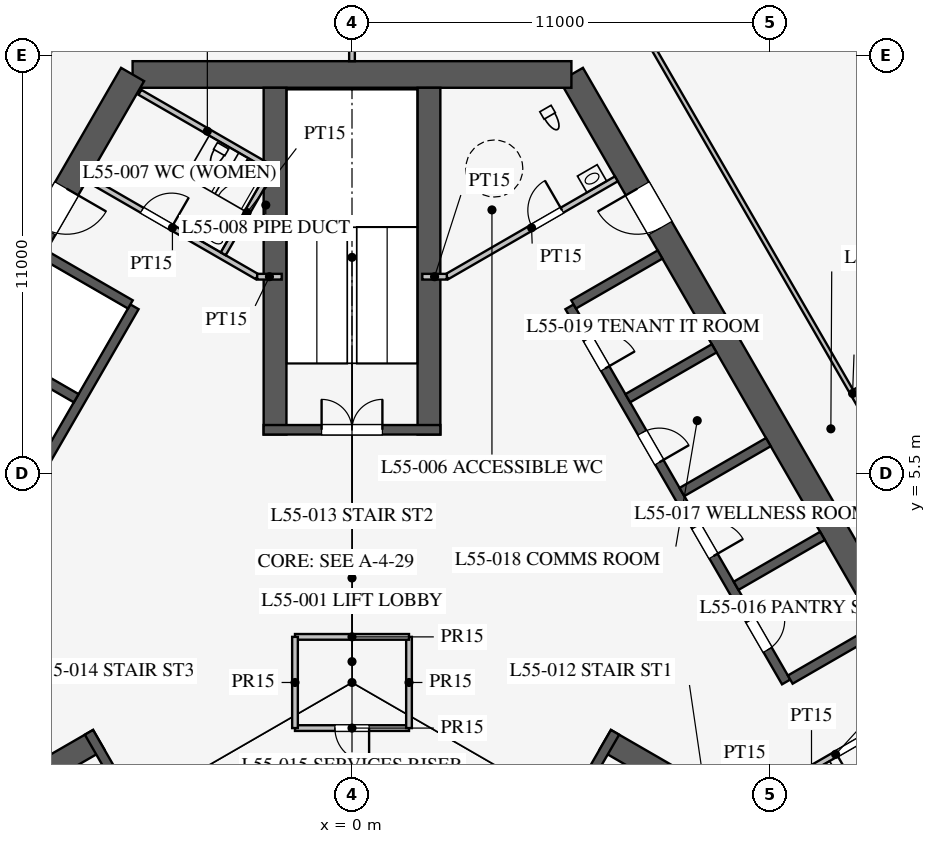
"""IFC4 building model, lengths in metres.
Left out: names, types, materials, properties, quantities, classifications, styles, units other than length and angle.
Written with IfcOpenShell. Run it as: python <this file> out.ifc"""

import sys

from ifc_helpers import new_model, si_unit, direction, frame, frame_2d, origin, place, context, subcontext, project, spatial, rectangle, extrude, element, fill, save


model = new_model("IFC4")
c1 = context("Model", 3, precision=1e-05, world=origin(), true_north=direction((0.0, 1.0)))
c2 = subcontext(c1, "Body", "Model", "MODEL_VIEW")
j1 = project(units=[si_unit("LENGTHUNIT", "METRE"), si_unit("PLANEANGLEUNIT", "RADIAN")], contexts=[c1])
p1 = place(None, origin())
s1 = spatial("IfcSite", under=j1, at=p1, CompositionType="ELEMENT")
p2 = place(p1, origin())
s2 = spatial("IfcBuilding", under=s1, at=p2, CompositionType="ELEMENT")
p3 = place(p2, frame((0.0, 0.0, 240.1)))
s3 = spatial("IfcBuildingStorey", under=s2, at=p3, CompositionType="ELEMENT", Elevation=240.1)
p4 = place(p3, frame((16.743, -3.0, 0.0), z_axis=(0.0, 0.0, 1.0), x_axis=(-0.500002442456, 0.866023993627, 0.0)))
e1 = element("IfcWall", 1, at=p4, inside=s3, PredefinedType="SHEAR", context=c2, shape_type="SweptSolid", body=[
    extrude(rectangle(XDim=21.939, YDim=0.7, at=frame_2d((10.97, 0.0))), origin(), (0.0, 0.0, 1.0), 4.2),
])
p5 = place(p4, frame((17.27, 0.0, 0.0)))
e2 = element("IfcOpeningElement", 2, at=p5, cuts=e1, PredefinedType="OPENING", context=c2, shape_type="SweptSolid", body=[
    extrude(rectangle(XDim=1.2, YDim=2.1, at=frame_2d((0.6, 1.05))), frame((0.0, 0.36, 0.0), z_axis=(0.0, -1.0, 0.0), x_axis=(1.0, 0.0, 0.0)), (0.0, 0.0, 1.0), 0.72),
])
p6 = place(p4, frame((3.47, 0.0, 0.0)))
e3 = element("IfcOpeningElement", 3, at=p6, cuts=e1, PredefinedType="OPENING", context=c2, shape_type="SweptSolid", body=[
    extrude(rectangle(XDim=1.2, YDim=2.1, at=frame_2d((0.6, 1.05))), frame((0.0, 0.36, 0.0), z_axis=(0.0, -1.0, 0.0), x_axis=(1.0, 0.0, 0.0)), (0.0, 0.0, 1.0), 0.72),
])
p7 = place(p3, frame((5.773, 16.0, 0.0), z_axis=(0.0, 0.0, 1.0), x_axis=(-1.0, 0.0, 0.0)))
e4 = element("IfcWall", 4, at=p7, inside=s3, PredefinedType="SHEAR", context=c2, shape_type="SweptSolid", body=[
    extrude(rectangle(XDim=11.547, YDim=0.7, at=frame_2d((5.773, 0.0))), origin(), (0.0, 0.0, 1.0), 4.2),
])
p8 = place(p3, frame((-5.773, 16.0, 0.0), z_axis=(0.0, 0.0, 1.0), x_axis=(-0.500002442456, -0.866023993627, 0.0)))
e5 = element("IfcWall", 5, at=p8, inside=s3, PredefinedType="SHEAR", context=c2, shape_type="SweptSolid", body=[
    extrude(rectangle(XDim=21.939, YDim=0.7, at=frame_2d((10.97, 0.0))), origin(), (0.0, 0.0, 1.0), 4.2),
])
p9 = place(p8, frame((17.27, 0.0, 0.0)))
e6 = element("IfcOpeningElement", 6, at=p9, cuts=e5, PredefinedType="OPENING", context=c2, shape_type="SweptSolid", body=[
    extrude(rectangle(XDim=1.2, YDim=2.1, at=frame_2d((0.6, 1.05))), frame((0.0, 0.36, 0.0), z_axis=(0.0, -1.0, 0.0), x_axis=(1.0, 0.0, 0.0)), (0.0, 0.0, 1.0), 0.72),
])
p10 = place(p8, frame((3.47, 0.0, 0.0)))
e7 = element("IfcOpeningElement", 7, at=p10, cuts=e5, PredefinedType="OPENING", context=c2, shape_type="SweptSolid", body=[
    extrude(rectangle(XDim=1.2, YDim=2.1, at=frame_2d((0.6, 1.05))), frame((0.0, 0.36, 0.0), z_axis=(0.0, -1.0, 0.0), x_axis=(1.0, 0.0, 0.0)), (0.0, 0.0, 1.0), 0.72),
])
p11 = place(p3, frame((11.424, 0.014, 0.0), z_axis=(0.0, 0.0, 1.0), x_axis=(-0.500001763848, 0.866024385424, 0.0)))
e8 = element("IfcWall", 8, at=p11, inside=s3, PredefinedType="SHEAR", context=c2, shape_type="SweptSolid", body=[
    extrude(rectangle(XDim=11.4, YDim=0.25, at=frame_2d((5.7, 0.0))), origin(), (0.0, 0.0, 1.0), 4.2),
])
p12 = place(p11, frame((0.975, 0.0, 0.0)))
e9 = element("IfcOpeningElement", 9, at=p12, cuts=e8, PredefinedType="OPENING", context=c2, shape_type="SweptSolid", body=[
    extrude(rectangle(XDim=0.9, YDim=2.1, at=frame_2d((0.45, 1.05))), frame((0.0, 0.135, 0.0), z_axis=(0.0, -1.0, 0.0), x_axis=(1.0, 0.0, 0.0)), (0.0, 0.0, 1.0), 0.27),
])
p13 = place(p11, frame((3.825, 0.0, 0.0)))
e10 = element("IfcOpeningElement", 10, at=p13, cuts=e8, PredefinedType="OPENING", context=c2, shape_type="SweptSolid", body=[
    extrude(rectangle(XDim=0.9, YDim=2.1, at=frame_2d((0.45, 1.05))), frame((0.0, 0.135, 0.0), z_axis=(0.0, -1.0, 0.0), x_axis=(1.0, 0.0, 0.0)), (0.0, 0.0, 1.0), 0.27),
])
p14 = place(p11, frame((6.675, 0.0, 0.0)))
e11 = element("IfcOpeningElement", 11, at=p14, cuts=e8, PredefinedType="OPENING", context=c2, shape_type="SweptSolid", body=[
    extrude(rectangle(XDim=0.9, YDim=2.1, at=frame_2d((0.45, 1.05))), frame((0.0, 0.135, 0.0), z_axis=(0.0, -1.0, 0.0), x_axis=(1.0, 0.0, 0.0)), (0.0, 0.0, 1.0), 0.27),
])
p15 = place(p11, frame((9.525, 0.0, 0.0)))
e12 = element("IfcOpeningElement", 12, at=p15, cuts=e8, PredefinedType="OPENING", context=c2, shape_type="SweptSolid", body=[
    extrude(rectangle(XDim=0.9, YDim=2.1, at=frame_2d((0.45, 1.05))), frame((0.0, 0.135, 0.0), z_axis=(0.0, -1.0, 0.0), x_axis=(1.0, 0.0, 0.0)), (0.0, 0.0, 1.0), 0.27),
])
for number, where, z_axis, x_axis in (
    (13, (11.532, 0.076, 0.0), (0.0, 0.0, 1.0), (0.866, 0.5, 0.0)),
    (14, (10.107, 2.544, 0.0), (0.0, 0.0, 1.0), (0.866, 0.5, 0.0)),
    (15, (8.682, 5.012, 0.0), (0.0, 0.0, 1.0), (0.866, 0.5, 0.0)),
    (16, (7.257, 7.481, 0.0), (0.0, 0.0, 1.0), (0.866, 0.5, 0.0)),
    (17, (5.832, 9.949, 0.0), (0.0, 0.0, 1.0), (0.866, 0.5, 0.0)),
):
    element("IfcWall", number, at=place(p3, frame(where, z_axis=z_axis, x_axis=x_axis)), inside=s3, PredefinedType="SHEAR", context=c2, shape_type="SweptSolid", body=[
        extrude(rectangle(XDim=2.625, YDim=0.25, at=frame_2d((1.312, 0.0))), origin(), (0.0, 0.0, 1.0), 4.2),
    ])
p16 = place(p3, frame((-5.724, 9.886, 0.0), z_axis=(0.0, 0.0, 1.0), x_axis=(-0.500001763848, -0.866024385424, 0.0)))
e18 = element("IfcWall", 18, at=p16, inside=s3, PredefinedType="SHEAR", context=c2, shape_type="SweptSolid", body=[
    extrude(rectangle(XDim=11.4, YDim=0.25, at=frame_2d((5.7, 0.0))), origin(), (0.0, 0.0, 1.0), 4.2),
])
p17 = place(p16, frame((6.525, 0.0, 0.0)))
e19 = element("IfcOpeningElement", 19, at=p17, cuts=e18, PredefinedType="OPENING", context=c2, shape_type="SweptSolid", body=[
    extrude(rectangle(XDim=1.2, YDim=2.2, at=frame_2d((0.6, 1.1))), frame((0.0, 0.135, 0.0), z_axis=(0.0, -1.0, 0.0), x_axis=(1.0, 0.0, 0.0)), (0.0, 0.0, 1.0), 0.27),
])
p18 = place(p16, frame((9.375, 0.0, 0.0)))
e20 = element("IfcOpeningElement", 20, at=p18, cuts=e18, PredefinedType="OPENING", context=c2, shape_type="SweptSolid", body=[
    extrude(rectangle(XDim=1.2, YDim=2.2, at=frame_2d((0.6, 1.1))), frame((0.0, 0.135, 0.0), z_axis=(0.0, -1.0, 0.0), x_axis=(1.0, 0.0, 0.0)), (0.0, 0.0, 1.0), 0.27),
])
for number, where, z_axis, x_axis in (
    (21, (-5.832, 9.949, 0.0), (0.0, 0.0, 1.0), (-0.866, 0.5, 0.0)),
    (22, (-7.257, 7.481, 0.0), (0.0, 0.0, 1.0), (-0.866, 0.5, 0.0)),
):
    element("IfcWall", number, at=place(p3, frame(where, z_axis=z_axis, x_axis=x_axis)), inside=s3, PredefinedType="SHEAR", context=c2, shape_type="SweptSolid", body=[
        extrude(rectangle(XDim=2.625, YDim=0.25, at=frame_2d((1.312, 0.0))), origin(), (0.0, 0.0, 1.0), 4.2),
    ])
p19 = place(p3, frame((6.663, -1.509, 0.0), z_axis=(0.0, 0.0, 1.0), x_axis=(0.866028310072, -0.499994966129, 0.0)))
e23 = element("IfcWall", 23, at=p19, inside=s3, PredefinedType="SHEAR", context=c2, shape_type="SweptSolid", body=[
    extrude(rectangle(XDim=9.125, YDim=0.6, at=frame_2d((4.562, 0.0))), origin(), (0.0, 0.0, 1.0), 4.2),
])
p20 = place(p3, frame((4.597, -5.339, 0.0), z_axis=(0.0, 0.0, 1.0), x_axis=(0.499984536904, 0.866034331223, 0.0)))
e24 = element("IfcWall", 24, at=p20, inside=s3, PredefinedType="SHEAR", context=c2, shape_type="SweptSolid", body=[
    extrude(rectangle(XDim=4.65, YDim=0.25, at=frame_2d((2.325, 0.0))), origin(), (0.0, 0.0, 1.0), 4.2),
])
p21 = place(p20, frame((1.525, 0.0, 0.0)))
e25 = element("IfcOpeningElement", 25, at=p21, cuts=e24, PredefinedType="OPENING", context=c2, shape_type="SweptSolid", body=[
    extrude(rectangle(XDim=1.6, YDim=2.1, at=frame_2d((0.8, 1.05))), frame((0.0, 0.135, 0.0), z_axis=(0.0, -1.0, 0.0), x_axis=(1.0, 0.0, 0.0)), (0.0, 0.0, 1.0), 0.27),
])
for number, where, z_axis, x_axis in (
    (26, (2.025, 6.525, 0.0), (0.0, 0.0, 1.0), (0.0, 1.0, 0.0)),
    (27, (-2.025, 6.525, 0.0), (0.0, 0.0, 1.0), (0.0, 1.0, 0.0)),
):
    element("IfcWall", number, at=place(p3, frame(where, z_axis=z_axis, x_axis=x_axis)), inside=s3, PredefinedType="SHEAR", context=c2, shape_type="SweptSolid", body=[
        extrude(rectangle(XDim=9.125, YDim=0.6, at=frame_2d((4.562, 0.0))), origin(), (0.0, 0.0, 1.0), 4.2),
    ])
p22 = place(p3, frame((2.325, 6.65, 0.0), z_axis=(0.0, 0.0, 1.0), x_axis=(-1.0, 0.0, 0.0)))
e28 = element("IfcWall", 28, at=p22, inside=s3, PredefinedType="SHEAR", context=c2, shape_type="SweptSolid", body=[
    extrude(rectangle(XDim=4.65, YDim=0.25, at=frame_2d((2.325, 0.0))), origin(), (0.0, 0.0, 1.0), 4.2),
])
p23 = place(p22, frame((1.525, 0.0, 0.0)))
e29 = element("IfcOpeningElement", 29, at=p23, cuts=e28, PredefinedType="OPENING", context=c2, shape_type="SweptSolid", body=[
    extrude(rectangle(XDim=1.6, YDim=2.1, at=frame_2d((0.8, 1.05))), frame((0.0, 0.135, 0.0), z_axis=(0.0, -1.0, 0.0), x_axis=(1.0, 0.0, 0.0)), (0.0, 0.0, 1.0), 0.27),
])
p24 = place(p3, frame((-6.663, -1.509, 0.0), z_axis=(0.0, 0.0, 1.0), x_axis=(-0.866028310072, -0.499994966129, 0.0)))
e30 = element("IfcWall", 30, at=p24, inside=s3, PredefinedType="SHEAR", context=c2, shape_type="SweptSolid", body=[
    extrude(rectangle(XDim=9.125, YDim=0.6, at=frame_2d((4.562, 0.0))), origin(), (0.0, 0.0, 1.0), 4.2),
])
p25 = place(p3, frame((-6.922, -1.312, 0.0), z_axis=(0.0, 0.0, 1.0), x_axis=(0.499984536904, -0.866034331223, 0.0)))
e31 = element("IfcWall", 31, at=p25, inside=s3, PredefinedType="SHEAR", context=c2, shape_type="SweptSolid", body=[
    extrude(rectangle(XDim=4.65, YDim=0.25, at=frame_2d((2.325, 0.0))), origin(), (0.0, 0.0, 1.0), 4.2),
])
p26 = place(p25, frame((1.525, 0.0, 0.0)))
e32 = element("IfcOpeningElement", 32, at=p26, cuts=e31, PredefinedType="OPENING", context=c2, shape_type="SweptSolid", body=[
    extrude(rectangle(XDim=1.6, YDim=2.1, at=frame_2d((0.8, 1.05))), frame((0.0, 0.135, 0.0), z_axis=(0.0, -1.0, 0.0), x_axis=(1.0, 0.0, 0.0)), (0.0, 0.0, 1.0), 0.27),
])
p27 = place(p3, frame((2.495, 10.678, 0.0), z_axis=(0.0, 0.0, 1.0), x_axis=(0.866037967349, 0.499978238636, 0.0)))
e33 = element("IfcWall", 33, at=p27, inside=s3, PredefinedType="PARTITIONING", context=c2, shape_type="SweptSolid", body=[
    extrude(rectangle(XDim=5.15, YDim=0.15, at=frame_2d((2.575, 0.0))), origin(), (0.0, 0.0, 1.0), 4.0),
])
p28 = place(p27, frame((2.6, 0.0, 0.0)))
e34 = element("IfcOpeningElement", 34, at=p28, cuts=e33, PredefinedType="OPENING", context=c2, shape_type="SweptSolid", body=[
    extrude(rectangle(XDim=0.9, YDim=2.1, at=frame_2d((0.45, 1.05))), frame((0.0, 0.085, 0.0), z_axis=(0.0, -1.0, 0.0), x_axis=(1.0, 0.0, 0.0)), (0.0, 0.0, 1.0), 0.17),
])
p29 = place(p3, frame((10.495, -3.178, 0.0), z_axis=(0.0, 0.0, 1.0), x_axis=(0.866037967349, 0.499978238636, 0.0)))
e35 = element("IfcWall", 35, at=p29, inside=s3, PredefinedType="PARTITIONING", context=c2, shape_type="SweptSolid", body=[
    extrude(rectangle(XDim=5.15, YDim=0.15, at=frame_2d((2.575, 0.0))), origin(), (0.0, 0.0, 1.0), 4.0),
])
p30 = place(p29, frame((2.6, 0.0, 0.0)))
e36 = element("IfcOpeningElement", 36, at=p30, cuts=e35, PredefinedType="OPENING", context=c2, shape_type="SweptSolid", body=[
    extrude(rectangle(XDim=0.9, YDim=2.1, at=frame_2d((0.45, 1.05))), frame((0.0, 0.085, 0.0), z_axis=(0.0, -1.0, 0.0), x_axis=(1.0, 0.0, 0.0)), (0.0, 0.0, 1.0), 0.17),
])
p31 = place(p3, frame((-2.495, 10.678, 0.0), z_axis=(0.0, 0.0, 1.0), x_axis=(-0.866037967349, 0.499978238636, 0.0)))
e37 = element("IfcWall", 37, at=p31, inside=s3, PredefinedType="PARTITIONING", context=c2, shape_type="SweptSolid", body=[
    extrude(rectangle(XDim=5.15, YDim=0.15, at=frame_2d((2.575, 0.0))), origin(), (0.0, 0.0, 1.0), 4.0),
])
p32 = place(p31, frame((2.6, 0.0, 0.0)))
e38 = element("IfcOpeningElement", 38, at=p32, cuts=e37, PredefinedType="OPENING", context=c2, shape_type="SweptSolid", body=[
    extrude(rectangle(XDim=0.9, YDim=2.1, at=frame_2d((0.45, 1.05))), frame((0.0, 0.085, 0.0), z_axis=(0.0, -1.0, 0.0), x_axis=(1.0, 0.0, 0.0)), (0.0, 0.0, 1.0), 0.17),
])
for number, where, z_axis, x_axis in (
    (39, (2.495, 10.678, 0.0), (0.0, 0.0, 1.0), (-1.0, 0.0, 0.0)),
    (40, (-2.495, 10.678, 0.0), (0.0, 0.0, 1.0), (1.0, 0.0, 0.0)),
):
    element("IfcWall", number, at=place(p3, frame(where, z_axis=z_axis, x_axis=x_axis)), inside=s3, PredefinedType="PARTITIONING", context=c2, shape_type="SweptSolid", body=[
        extrude(rectangle(XDim=0.645, YDim=0.15, at=frame_2d((0.323, 0.0))), origin(), (0.0, 0.0, 1.0), 4.0),
    ])
p33 = place(p3, frame((-2.031, 13.482, 0.0), z_axis=(0.0, 0.0, 1.0), x_axis=(-0.866050731258, 0.499956128963, 0.0)))
e41 = element("IfcWall", 41, at=p33, inside=s3, PredefinedType="PARTITIONING", context=c2, shape_type="SweptSolid", body=[
    extrude(rectangle(XDim=4.1, YDim=0.15, at=frame_2d((2.05, 0.0))), origin(), (0.0, 0.0, 1.0), 4.0),
])
p34 = place(p3, frame((-3.389, 11.281, 0.0), z_axis=(0.0, 0.0, 1.0), x_axis=(0.499989096993, 0.866031698547, 0.0)))
e42 = element("IfcWall", 42, at=p34, inside=s3, PredefinedType="PARTITIONING", context=c2, shape_type="SweptSolid", body=[
    extrude(rectangle(XDim=2.51, YDim=0.15, at=frame_2d((1.255, 0.0))), origin(), (0.0, 0.0, 1.0), 4.0),
])
p35 = place(p3, frame((-1.5, -1.2, 0.0), z_axis=(0.0, 0.0, 1.0), x_axis=(1.0, 0.0, 0.0)))
e43 = element("IfcWall", 43, at=p35, inside=s3, PredefinedType="PARTITIONING", context=c2, shape_type="SweptSolid", body=[
    extrude(rectangle(XDim=3.0, YDim=0.15, at=frame_2d((1.5, 0.0))), origin(), (0.0, 0.0, 1.0), 4.0),
])
p36 = place(p35, frame((1.05, 0.0, 0.0)))
e44 = element("IfcOpeningElement", 44, at=p36, cuts=e43, PredefinedType="OPENING", context=c2, shape_type="SweptSolid", body=[
    extrude(rectangle(XDim=0.9, YDim=2.1, at=frame_2d((0.45, 1.05))), frame((0.0, 0.085, 0.0), z_axis=(0.0, -1.0, 0.0), x_axis=(1.0, 0.0, 0.0)), (0.0, 0.0, 1.0), 0.17),
])
p37 = place(p3, frame((1.5, -1.2, 0.0), z_axis=(0.0, 0.0, 1.0), x_axis=(0.0, 1.0, 0.0)))
e45 = element("IfcWall", 45, at=p37, inside=s3, PredefinedType="PARTITIONING", context=c2, shape_type="SweptSolid", body=[
    extrude(rectangle(XDim=2.4, YDim=0.15, at=frame_2d((1.2, 0.0))), origin(), (0.0, 0.0, 1.0), 4.0),
])
p38 = place(p3, frame((1.5, 1.2, 0.0), z_axis=(0.0, 0.0, 1.0), x_axis=(-1.0, 0.0, 0.0)))
e46 = element("IfcWall", 46, at=p38, inside=s3, PredefinedType="PARTITIONING", context=c2, shape_type="SweptSolid", body=[
    extrude(rectangle(XDim=3.0, YDim=0.15, at=frame_2d((1.5, 0.0))), origin(), (0.0, 0.0, 1.0), 4.0),
])
p39 = place(p3, frame((-1.5, 1.2, 0.0), z_axis=(0.0, 0.0, 1.0), x_axis=(0.0, -1.0, 0.0)))
e47 = element("IfcWall", 47, at=p39, inside=s3, PredefinedType="PARTITIONING", context=c2, shape_type="SweptSolid", body=[
    extrude(rectangle(XDim=2.4, YDim=0.15, at=frame_2d((1.2, 0.0))), origin(), (0.0, 0.0, 1.0), 4.0),
])
p40 = place(p3, frame((0.0, 16.35, 0.0), z_axis=(0.0, 0.0, 1.0), x_axis=(0.0, 1.0, 0.0)))
e48 = element("IfcWall", 48, at=p40, inside=s3, PredefinedType="PARTITIONING", context=c2, shape_type="SweptSolid", body=[
    extrude(rectangle(XDim=15.0, YDim=0.15, at=frame_2d((7.5, 0.0))), origin(), (0.0, 0.0, 1.0), 2.4),
])
p41 = place(p3, frame((13.224, 7.635, 0.0), z_axis=(0.0, 0.0, 1.0), x_axis=(0.866035375346, 0.499982728352, 0.0)))
e49 = element("IfcWall", 49, at=p41, inside=s3, PredefinedType="PARTITIONING", context=c2, shape_type="SweptSolid", body=[
    extrude(rectangle(XDim=8.526, YDim=0.15, at=frame_2d((4.263, 0.0))), origin(), (0.0, 0.0, 1.0), 2.992),
])
p42 = place(p3, frame((26.328, -15.182, 0.0), z_axis=(0.0, 0.0, 1.0), x_axis=(-0.500000626146, 0.866025042278, 0.0)))
e50 = element("IfcWall", 50, at=p42, inside=s3, PredefinedType="PARTITIONING", context=c2, shape_type="SweptSolid", body=[
    extrude(rectangle(XDim=52.624, YDim=0.12, at=frame_2d((26.312, 0.0))), origin(), (0.0, 0.0, 1.0), 2.9),
])
p43 = place(p42, frame((10.15, 0.0, 0.15)))
e51 = element("IfcOpeningElement", 51, at=p43, cuts=e50, PredefinedType="OPENING", context=c2, shape_type="SweptSolid", body=[
    extrude(rectangle(XDim=1.8, YDim=2.1, at=frame_2d((0.9, 1.05))), frame((0.0, 0.07, 0.0), z_axis=(0.0, -1.0, 0.0), x_axis=(1.0, 0.0, 0.0)), (0.0, 0.0, 1.0), 0.14),
])
p44 = place(p42, frame((40.65, 0.0, 0.15)))
e52 = element("IfcOpeningElement", 52, at=p44, cuts=e50, PredefinedType="OPENING", context=c2, shape_type="SweptSolid", body=[
    extrude(rectangle(XDim=1.8, YDim=2.1, at=frame_2d((0.9, 1.05))), frame((0.0, 0.07, 0.0), z_axis=(0.0, -1.0, 0.0), x_axis=(1.0, 0.0, 0.0)), (0.0, 0.0, 1.0), 0.14),
])
p45 = place(p3, frame((-0.016, 30.392, 0.0), z_axis=(0.0, 0.0, 1.0), x_axis=(-0.500000626146, -0.866025042278, 0.0)))
e53 = element("IfcWall", 53, at=p45, inside=s3, PredefinedType="PARTITIONING", context=c2, shape_type="SweptSolid", body=[
    extrude(rectangle(XDim=52.624, YDim=0.12, at=frame_2d((26.312, 0.0))), origin(), (0.0, 0.0, 1.0), 2.9),
])
p46 = place(p45, frame((10.15, 0.0, 0.15)))
e54 = element("IfcOpeningElement", 54, at=p46, cuts=e53, PredefinedType="OPENING", context=c2, shape_type="SweptSolid", body=[
    extrude(rectangle(XDim=1.8, YDim=2.1, at=frame_2d((0.9, 1.05))), frame((0.0, 0.07, 0.0), z_axis=(0.0, -1.0, 0.0), x_axis=(1.0, 0.0, 0.0)), (0.0, 0.0, 1.0), 0.14),
])
p47 = place(p45, frame((40.65, 0.0, 0.15)))
e55 = element("IfcOpeningElement", 55, at=p47, cuts=e53, PredefinedType="OPENING", context=c2, shape_type="SweptSolid", body=[
    extrude(rectangle(XDim=1.8, YDim=2.1, at=frame_2d((0.9, 1.05))), frame((0.0, 0.07, 0.0), z_axis=(0.0, -1.0, 0.0), x_axis=(1.0, 0.0, 0.0)), (0.0, 0.0, 1.0), 0.14),
])
p48 = place(p28, origin())
e56 = element("IfcDoor", 56, at=p48, inside=s3, OperationType="SINGLE_SWING_RIGHT", PredefinedType="DOOR", context=c2, shape_type="SweptSolid", body=[
    extrude(rectangle(XDim=0.9, YDim=2.1, at=frame_2d((0.45, 1.05))), frame((0.0, 0.025, 0.0), z_axis=(0.0, -1.0, 0.0), x_axis=(1.0, 0.0, 0.0)), (0.0, 0.0, 1.0), 0.05),
])
fill(e34, e56)
p49 = place(p30, frame((0.9, 0.0, 0.0), z_axis=(0.0, 0.0, 1.0), x_axis=(-1.0, 0.0, 0.0)))
e57 = element("IfcDoor", 57, at=p49, inside=s3, OperationType="SINGLE_SWING_RIGHT", PredefinedType="DOOR", context=c2, shape_type="SweptSolid", body=[
    extrude(rectangle(XDim=0.9, YDim=2.1, at=frame_2d((0.45, 1.05))), frame((0.0, 0.025, 0.0), z_axis=(0.0, -1.0, 0.0), x_axis=(1.0, 0.0, 0.0)), (0.0, 0.0, 1.0), 0.05),
])
fill(e36, e57)
p50 = place(p32, frame((0.9, 0.0, 0.0), z_axis=(0.0, 0.0, 1.0), x_axis=(-1.0, 0.0, 0.0)))
e58 = element("IfcDoor", 58, at=p50, inside=s3, OperationType="SINGLE_SWING_RIGHT", PredefinedType="DOOR", context=c2, shape_type="SweptSolid", body=[
    extrude(rectangle(XDim=0.9, YDim=2.1, at=frame_2d((0.45, 1.05))), frame((0.0, 0.025, 0.0), z_axis=(0.0, -1.0, 0.0), x_axis=(1.0, 0.0, 0.0)), (0.0, 0.0, 1.0), 0.05),
])
fill(e38, e58)
p51 = place(p36, frame((0.9, 0.0, 0.0), z_axis=(0.0, 0.0, 1.0), x_axis=(-1.0, 0.0, 0.0)))
e59 = element("IfcDoor", 59, at=p51, inside=s3, OperationType="SINGLE_SWING_LEFT", PredefinedType="DOOR", context=c2, shape_type="SweptSolid", body=[
    extrude(rectangle(XDim=0.9, YDim=2.1, at=frame_2d((0.45, 1.05))), frame((0.0, 0.025, 0.0), z_axis=(0.0, -1.0, 0.0), x_axis=(1.0, 0.0, 0.0)), (0.0, 0.0, 1.0), 0.05),
])
fill(e44, e59)
p52 = place(p23, frame((1.6, 0.0, 0.0), z_axis=(0.0, 0.0, 1.0), x_axis=(-1.0, 0.0, 0.0)))
e60 = element("IfcDoor", 60, at=p52, inside=s3, OperationType="DOUBLE_DOOR_SINGLE_SWING", PredefinedType="DOOR", context=c2, shape_type="SweptSolid", body=[
    extrude(rectangle(XDim=1.6, YDim=2.1, at=frame_2d((0.8, 1.05))), frame((0.0, 0.025, 0.0), z_axis=(0.0, -1.0, 0.0), x_axis=(1.0, 0.0, 0.0)), (0.0, 0.0, 1.0), 0.05),
])
fill(e29, e60)
p53 = place(p5, origin())
e61 = element("IfcDoor", 61, at=p53, inside=s3, OperationType="SINGLE_SWING_RIGHT", PredefinedType="DOOR", context=c2, shape_type="SweptSolid", body=[
    extrude(rectangle(XDim=1.2, YDim=2.1, at=frame_2d((0.6, 1.05))), frame((0.0, 0.025, 0.0), z_axis=(0.0, -1.0, 0.0), x_axis=(1.0, 0.0, 0.0)), (0.0, 0.0, 1.0), 0.05),
])
fill(e2, e61)
p54 = place(p10, origin())
e62 = element("IfcDoor", 62, at=p54, inside=s3, OperationType="SINGLE_SWING_LEFT", PredefinedType="DOOR", context=c2, shape_type="SweptSolid", body=[
    extrude(rectangle(XDim=1.2, YDim=2.1, at=frame_2d((0.6, 1.05))), frame((0.0, 0.025, 0.0), z_axis=(0.0, -1.0, 0.0), x_axis=(1.0, 0.0, 0.0)), (0.0, 0.0, 1.0), 0.05),
])
fill(e7, e62)
p55 = place(p12, frame((0.9, 0.0, 0.0), z_axis=(0.0, 0.0, 1.0), x_axis=(-1.0, 0.0, 0.0)))
e63 = element("IfcDoor", 63, at=p55, inside=s3, OperationType="SINGLE_SWING_LEFT", PredefinedType="DOOR", context=c2, shape_type="SweptSolid", body=[
    extrude(rectangle(XDim=0.9, YDim=2.1, at=frame_2d((0.45, 1.05))), frame((0.0, 0.025, 0.0), z_axis=(0.0, -1.0, 0.0), x_axis=(1.0, 0.0, 0.0)), (0.0, 0.0, 1.0), 0.05),
])
fill(e9, e63)
p56 = place(p13, frame((0.9, 0.0, 0.0), z_axis=(0.0, 0.0, 1.0), x_axis=(-1.0, 0.0, 0.0)))
e64 = element("IfcDoor", 64, at=p56, inside=s3, OperationType="SINGLE_SWING_RIGHT", PredefinedType="DOOR", context=c2, shape_type="SweptSolid", body=[
    extrude(rectangle(XDim=0.9, YDim=2.1, at=frame_2d((0.45, 1.05))), frame((0.0, 0.025, 0.0), z_axis=(0.0, -1.0, 0.0), x_axis=(1.0, 0.0, 0.0)), (0.0, 0.0, 1.0), 0.05),
])
fill(e10, e64)
p57 = place(p14, frame((0.9, 0.0, 0.0), z_axis=(0.0, 0.0, 1.0), x_axis=(-1.0, 0.0, 0.0)))
e65 = element("IfcDoor", 65, at=p57, inside=s3, OperationType="SINGLE_SWING_RIGHT", PredefinedType="DOOR", context=c2, shape_type="SweptSolid", body=[
    extrude(rectangle(XDim=0.9, YDim=2.1, at=frame_2d((0.45, 1.05))), frame((0.0, 0.025, 0.0), z_axis=(0.0, -1.0, 0.0), x_axis=(1.0, 0.0, 0.0)), (0.0, 0.0, 1.0), 0.05),
])
fill(e11, e65)
p58 = place(p15, frame((0.9, 0.0, 0.0), z_axis=(0.0, 0.0, 1.0), x_axis=(-1.0, 0.0, 0.0)))
e66 = element("IfcDoor", 66, at=p58, inside=s3, OperationType="SINGLE_SWING_RIGHT", PredefinedType="DOOR", context=c2, shape_type="SweptSolid", body=[
    extrude(rectangle(XDim=0.9, YDim=2.1, at=frame_2d((0.45, 1.05))), frame((0.0, 0.025, 0.0), z_axis=(0.0, -1.0, 0.0), x_axis=(1.0, 0.0, 0.0)), (0.0, 0.0, 1.0), 0.05),
])
fill(e12, e66)
save(model, sys.argv[1])
